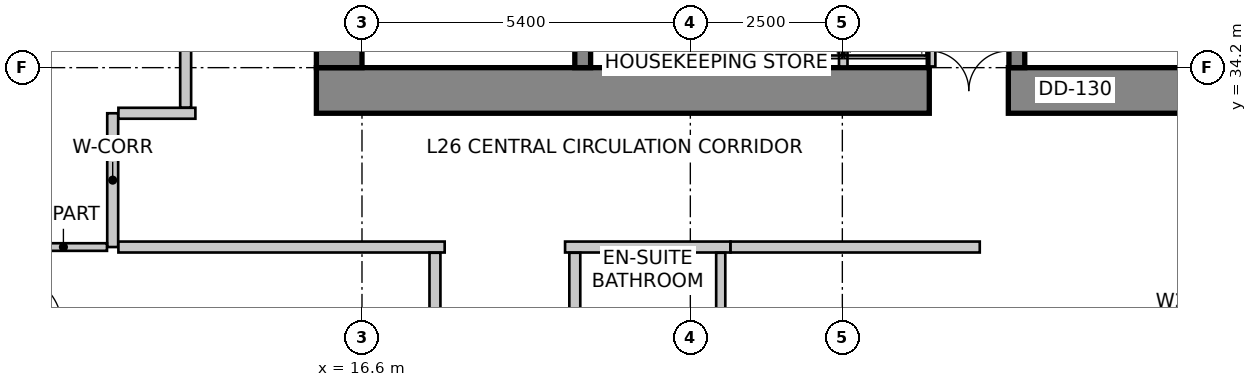
"""IFC4 building model, lengths in metres.
Left out: names, types, materials, properties, quantities, classifications, styles, units other than length and angle.
Written with IfcOpenShell. Run it as: python <this file> out.ifc"""

import sys

from ifc_helpers import new_model, si_unit, direction, frame, frame_2d, origin, place, context, subcontext, project, spatial, rectangle, extrude, source, transform, mapped, element, fill, save


model = new_model("IFC4")
c1 = context("Model", 3, precision=1e-05, world=origin(), true_north=direction((0.0, 1.0)))
c2 = subcontext(c1, "Body", "Model", "MODEL_VIEW")
j1 = project(units=[si_unit("LENGTHUNIT", "METRE"), si_unit("PLANEANGLEUNIT", "RADIAN")], contexts=[c1])
p1 = place(None, origin())
s1 = spatial("IfcSite", under=j1, at=p1, CompositionType="ELEMENT")
p2 = place(p1, origin())
s2 = spatial("IfcBuilding", under=s1, at=p2, CompositionType="ELEMENT")
p3 = place(p2, frame((0.0, 0.0, 110.6)))
s3 = spatial("IfcBuildingStorey", under=s2, at=p3, CompositionType="ELEMENT", Elevation=110.6)
p4 = place(p3, frame((15.85, 33.825, 0.0), z_axis=(0.0, 0.0, 1.0), x_axis=(1.0, 0.0, 0.0)))
e1 = element("IfcWall", 1, at=p4, inside=s3, PredefinedType="SHEAR", context=c2, shape_type="SweptSolid", body=[
    extrude(rectangle(XDim=15.9, YDim=0.75, at=frame_2d((7.95, 0.0))), origin(), (0.0, 0.0, 1.0), 3.6),
])
m1 = source(origin(), c2, "Body", "SweptSolid", [
    extrude(rectangle(XDim=1.3, YDim=2.15, at=frame_2d((0.65, 1.075))), frame((0.0, 0.385, 0.0), z_axis=(0.0, -1.0, 0.0), x_axis=(1.0, 0.0, 0.0)), (0.0, 0.0, 1.0), 0.77),
])
p5 = place(p4, frame((10.08, 0.0, 0.0)))
e2 = element("IfcOpeningElement", 2, at=p5, cuts=e1, PredefinedType="OPENING", context=c2, shape_type="MappedRepresentation", body=[
    mapped(m1, transform((0.0, 0.0, 0.0), scale=1.0)),
])
p6 = place(p3, frame((16.225, 34.2, 0.0), z_axis=(0.0, 0.0, 1.0), x_axis=(0.0, 1.0, 0.0)))
e3 = element("IfcWall", 3, at=p6, inside=s3, PredefinedType="SHEAR", context=c2, shape_type="SweptSolid", body=[
    extrude(rectangle(XDim=11.4, YDim=0.75, at=frame_2d((5.7, 0.0))), origin(), (0.0, 0.0, 1.0), 3.6),
])
m2 = source(origin(), c2, "Body", "SweptSolid", [
    extrude(rectangle(XDim=1.1, YDim=2.15, at=frame_2d((0.55, 1.075))), frame((0.0, 0.385, 0.0), z_axis=(0.0, -1.0, 0.0), x_axis=(1.0, 0.0, 0.0)), (0.0, 0.0, 1.0), 0.77),
])
p7 = place(p6, frame((7.15, 0.0, 0.0)))
e4 = element("IfcOpeningElement", 4, at=p7, cuts=e3, PredefinedType="OPENING", context=c2, shape_type="MappedRepresentation", body=[
    mapped(m2, transform((0.0, 0.0, 0.0), scale=1.0)),
])
p8 = place(p3, frame((20.23, 34.2, 0.0), z_axis=(0.0, 0.0, 1.0), x_axis=(0.0, 1.0, 0.0)))
e5 = element("IfcWall", 5, at=p8, inside=s3, PredefinedType="SHEAR", context=c2, shape_type="SweptSolid", body=[
    extrude(rectangle(XDim=9.06, YDim=0.26, at=frame_2d((4.53, 0.0))), origin(), (0.0, 0.0, 1.0), 3.6),
])
m3 = source(origin(), c2, "Body", "SweptSolid", [
    extrude(rectangle(XDim=1.1, YDim=2.15, at=frame_2d((0.55, 1.075))), frame((0.0, 0.14, 0.0), z_axis=(0.0, -1.0, 0.0), x_axis=(1.0, 0.0, 0.0)), (0.0, 0.0, 1.0), 0.28),
])
p9 = place(p8, frame((7.45, 0.0, 0.0)))
e6 = element("IfcOpeningElement", 6, at=p9, cuts=e5, PredefinedType="OPENING", context=c2, shape_type="MappedRepresentation", body=[
    mapped(m3, transform((0.0, 0.0, 0.0), scale=1.0)),
])
p10 = place(p3, frame((27.37, 34.2, 0.0), z_axis=(0.0, 0.0, 1.0), x_axis=(0.0, 1.0, 0.0)))
e7 = element("IfcWall", 7, at=p10, inside=s3, PredefinedType="SHEAR", context=c2, shape_type="SweptSolid", body=[
    extrude(rectangle(XDim=9.06, YDim=0.26, at=frame_2d((4.53, 0.0))), origin(), (0.0, 0.0, 1.0), 3.6),
])
p11 = place(p10, frame((7.45, 0.0, 0.0)))
e8 = element("IfcOpeningElement", 8, at=p11, cuts=e7, PredefinedType="OPENING", context=c2, shape_type="MappedRepresentation", body=[
    mapped(m3, transform((0.0, 0.0, 0.0), scale=1.0)),
])
p12 = place(p3, frame((28.884, 28.792, 0.0), z_axis=(0.0, 0.0, 1.0), x_axis=(0.707064797706, 0.707148762175, 0.0)))
e9 = element("IfcWall", 9, at=p12, inside=s3, PredefinedType="SOLIDWALL", context=c2, shape_type="SweptSolid", body=[
    extrude(rectangle(XDim=2.908, YDim=0.3, at=frame_2d((1.454, 0.0))), origin(), (0.0, 0.0, 1.0), 3.35),
])
m4 = source(origin(), c2, "Body", "SweptSolid", [
    extrude(rectangle(XDim=1.8, YDim=2.1, at=frame_2d((0.9, 1.05))), frame((0.0, 0.16, 0.0), z_axis=(0.0, -1.0, 0.0), x_axis=(1.0, 0.0, 0.0)), (0.0, 0.0, 1.0), 0.32),
])
p13 = place(p12, frame((0.554, 0.0, 0.85)))
e10 = element("IfcOpeningElement", 10, at=p13, cuts=e9, PredefinedType="OPENING", context=c2, shape_type="MappedRepresentation", body=[
    mapped(m4, transform((0.0, 0.0, 0.0), scale=1.0)),
])
p14 = place(p3, frame((13.269, 47.134, 0.0), z_axis=(0.0, 0.0, 1.0), x_axis=(-0.319929596295, -0.947441319246, 0.0)))
e11 = element("IfcWall", 11, at=p14, inside=s3, PredefinedType="SOLIDWALL", context=c2, shape_type="SweptSolid", body=[
    extrude(rectangle(XDim=16.134, YDim=0.3, at=frame_2d((8.067, 0.0))), origin(), (0.0, 0.0, 1.0), 3.35),
])
m5 = source(origin(), c2, "Body", "SweptSolid", [
    extrude(rectangle(XDim=2.4, YDim=2.2, at=frame_2d((1.2, 1.1))), frame((0.0, 0.16, 0.0), z_axis=(0.0, -1.0, 0.0), x_axis=(1.0, 0.0, 0.0)), (0.0, 0.0, 1.0), 0.32),
])
p15 = place(p14, frame((2.276, 0.0, 0.85)))
e12 = element("IfcOpeningElement", 12, at=p15, cuts=e11, PredefinedType="OPENING", context=c2, shape_type="MappedRepresentation", body=[
    mapped(m5, transform((0.0, 0.0, 0.0), scale=1.0)),
])
m6 = source(origin(), c2, "Body", "SweptSolid", [
    extrude(rectangle(XDim=2.1, YDim=2.0, at=frame_2d((1.05, 1.0))), frame((0.0, 0.16, 0.0), z_axis=(0.0, -1.0, 0.0), x_axis=(1.0, 0.0, 0.0)), (0.0, 0.0, 1.0), 0.32),
])
p16 = place(p14, frame((7.361, 0.0, 0.85)))
e13 = element("IfcOpeningElement", 13, at=p16, cuts=e11, PredefinedType="OPENING", context=c2, shape_type="MappedRepresentation", body=[
    mapped(m6, transform((0.0, 0.0, 0.0), scale=1.0)),
])
p17 = place(p14, frame((12.147, 0.0, 0.85)))
e14 = element("IfcOpeningElement", 14, at=p17, cuts=e11, PredefinedType="OPENING", context=c2, shape_type="MappedRepresentation", body=[
    mapped(m5, transform((0.0, 0.0, 0.0), scale=1.0)),
])
p18 = place(p3, frame((8.185, 31.834, 0.0), z_axis=(0.0, 0.0, 1.0), x_axis=(0.189707113148, -0.981840725994, 0.0)))
e15 = element("IfcWall", 15, at=p18, inside=s3, PredefinedType="SOLIDWALL", context=c2, shape_type="SweptSolid", body=[
    extrude(rectangle(XDim=21.221, YDim=0.3, at=frame_2d((10.611, 0.0))), origin(), (0.0, 0.0, 1.0), 3.35),
])
m7 = source(origin(), c2, "Body", "SweptSolid", [
    extrude(rectangle(XDim=1.2, YDim=1.6, at=frame_2d((0.6, 0.8))), frame((0.0, 0.16, 0.0), z_axis=(0.0, -1.0, 0.0), x_axis=(1.0, 0.0, 0.0)), (0.0, 0.0, 1.0), 0.32),
])
p19 = place(p18, frame((1.127, 0.0, 0.85)))
e16 = element("IfcOpeningElement", 16, at=p19, cuts=e15, PredefinedType="OPENING", context=c2, shape_type="MappedRepresentation", body=[
    mapped(m7, transform((0.0, 0.0, 0.0), scale=1.0)),
])
p20 = place(p18, frame((4.369, 0.0, 0.85)))
e17 = element("IfcOpeningElement", 17, at=p20, cuts=e15, PredefinedType="OPENING", context=c2, shape_type="MappedRepresentation", body=[
    mapped(m6, transform((0.0, 0.0, 0.0), scale=1.0)),
])
p21 = place(p18, frame((8.521, 0.0, 0.85)))
e18 = element("IfcOpeningElement", 18, at=p21, cuts=e15, PredefinedType="OPENING", context=c2, shape_type="MappedRepresentation", body=[
    mapped(m7, transform((0.0, 0.0, 0.0), scale=1.0)),
])
p22 = place(p18, frame((12.021, 0.0, 0.85)))
e19 = element("IfcOpeningElement", 19, at=p22, cuts=e15, PredefinedType="OPENING", context=c2, shape_type="MappedRepresentation", body=[
    mapped(m6, transform((0.0, 0.0, 0.0), scale=1.0)),
])
p23 = place(p18, frame((17.091, 0.0, 0.85)))
e20 = element("IfcOpeningElement", 20, at=p23, cuts=e15, PredefinedType="OPENING", context=c2, shape_type="MappedRepresentation", body=[
    mapped(m5, transform((0.0, 0.0, 0.0), scale=1.0)),
])
for number, where, z_axis, x_axis in (
    (21, (25.96, 34.22, 0.0), (0.0, 0.0, 1.0), (0.0, 1.0, 0.0)),
    (22, (23.07, 34.22, 0.0), (0.0, 0.0, 1.0), (0.0, 1.0, 0.0)),
    (23, (24.515, 34.22, 0.0), (0.0, 0.0, 1.0), (0.0, 1.0, 0.0)),
):
    element("IfcWall", number, at=place(p3, frame(where, z_axis=z_axis, x_axis=x_axis)), inside=s3, PredefinedType="SOLIDWALL", context=c2, shape_type="SweptSolid", body=[
        extrude(rectangle(XDim=1.62, YDim=0.14, at=frame_2d((0.81, 0.0))), origin(), (0.0, 0.0, 1.0), 2.642),
    ])
p24 = place(p3, frame((12.5, 31.25, 0.0), z_axis=(0.0, 0.0, 1.0), x_axis=(0.0, 1.0, 0.0)))
e24 = element("IfcWall", 24, at=p24, inside=s3, PredefinedType="PARTITIONING", context=c2, shape_type="SweptSolid", body=[
    extrude(rectangle(XDim=2.2, YDim=0.18, at=frame_2d((1.1, 0.0))), origin(), (0.0, 0.0, 1.0), 3.034),
])
p25 = place(p3, frame((12.594, 33.45, 0.0), z_axis=(0.0, 0.0, 1.0), x_axis=(1.0, 0.0, 0.0)))
e25 = element("IfcWall", 25, at=p25, inside=s3, PredefinedType="PARTITIONING", context=c2, shape_type="SweptSolid", body=[
    extrude(rectangle(XDim=1.266, YDim=0.18, at=frame_2d((0.633, 0.0))), origin(), (0.0, 0.0, 1.0), 3.35),
])
p26 = place(p3, frame((17.96, 31.25, 0.0), z_axis=(0.0, 0.0, 1.0), x_axis=(-1.0, 0.0, 0.0)))
e26 = element("IfcWall", 26, at=p26, inside=s3, PredefinedType="PARTITIONING", context=c2, shape_type="SweptSolid", body=[
    extrude(rectangle(XDim=5.366, YDim=0.18, at=frame_2d((2.683, 0.0))), origin(), (0.0, 0.0, 1.0), 3.034),
])
p27 = place(p3, frame((22.66, 31.25, 0.0), z_axis=(0.0, 0.0, 1.0), x_axis=(-1.0, 0.0, 0.0)))
e27 = element("IfcWall", 27, at=p27, inside=s3, PredefinedType="PARTITIONING", context=c2, shape_type="SweptSolid", body=[
    extrude(rectangle(XDim=2.72, YDim=0.18, at=frame_2d((1.36, 0.0))), origin(), (0.0, 0.0, 1.0), 3.034),
])
p28 = place(p3, frame((26.76, 31.25, 0.0), z_axis=(0.0, 0.0, 1.0), x_axis=(-1.0, 0.0, 0.0)))
e28 = element("IfcWall", 28, at=p28, inside=s3, PredefinedType="PARTITIONING", context=c2, shape_type="SweptSolid", body=[
    extrude(rectangle(XDim=4.098, YDim=0.18, at=frame_2d((2.049, 0.0))), origin(), (0.0, 0.0, 1.0), 3.35),
])
p29 = place(p3, frame((13.7, 33.544, 0.0), z_axis=(0.0, 0.0, 1.0), x_axis=(0.0, 1.0, 0.0)))
e29 = element("IfcWall", 29, at=p29, inside=s3, PredefinedType="PARTITIONING", context=c2, shape_type="SweptSolid", body=[
    extrude(rectangle(XDim=13.86, YDim=0.18, at=frame_2d((6.93, 0.0))), origin(), (0.0, 0.0, 1.0), 2.492),
])
m8 = source(origin(), c2, "Body", "SweptSolid", [
    extrude(rectangle(XDim=0.9, YDim=2.15, at=frame_2d((0.45, 1.075))), frame((0.0, 0.1, 0.0), z_axis=(0.0, -1.0, 0.0), x_axis=(1.0, 0.0, 0.0)), (0.0, 0.0, 1.0), 0.2),
])
p30 = place(p29, frame((4.253, 0.0, 0.0)))
e30 = element("IfcOpeningElement", 30, at=p30, cuts=e29, PredefinedType="OPENING", context=c2, shape_type="MappedRepresentation", body=[
    mapped(m8, transform((0.0, 0.0, 0.0), scale=1.0)),
])
p31 = place(p3, frame((12.406, 31.25, 0.0), z_axis=(0.0, 0.0, 1.0), x_axis=(-1.0, 0.0, 0.0)))
e31 = element("IfcWall", 31, at=p31, inside=s3, PredefinedType="PARTITIONING", context=c2, shape_type="SweptSolid", body=[
    extrude(rectangle(XDim=1.433, YDim=0.125, at=frame_2d((0.717, 0.0))), origin(), (0.0, 0.0, 1.0), 2.492),
])
p32 = place(p3, frame((17.8, 24.162, 0.0), z_axis=(0.0, 0.0, 1.0), x_axis=(0.0, 1.0, 0.0)))
e32 = element("IfcWall", 32, at=p32, inside=s3, PredefinedType="PARTITIONING", context=c2, shape_type="SweptSolid", body=[
    extrude(rectangle(XDim=6.994, YDim=0.18, at=frame_2d((3.497, 0.0))), origin(), (0.0, 0.0, 1.0), 2.803),
])
p33 = place(p32, frame((3.047, 0.0, 0.0)))
e33 = element("IfcOpeningElement", 33, at=p33, cuts=e32, PredefinedType="OPENING", context=c2, shape_type="MappedRepresentation", body=[
    mapped(m8, transform((0.0, 0.0, 0.0), scale=1.0)),
])
p34 = place(p3, frame((20.1, 31.156, 0.0), z_axis=(0.0, 0.0, 1.0), x_axis=(0.0, -1.0, 0.0)))
e34 = element("IfcWall", 34, at=p34, inside=s3, PredefinedType="PARTITIONING", context=c2, shape_type="SweptSolid", body=[
    extrude(rectangle(XDim=2.266, YDim=0.18, at=frame_2d((1.133, 0.0))), origin(), (0.0, 0.0, 1.0), 3.034),
])
p35 = place(p3, frame((22.5, 31.156, 0.0), z_axis=(0.0, 0.0, 1.0), x_axis=(0.0, -1.0, 0.0)))
e35 = element("IfcWall", 35, at=p35, inside=s3, PredefinedType="PARTITIONING", context=c2, shape_type="SweptSolid", body=[
    extrude(rectangle(XDim=2.027, YDim=0.15, at=frame_2d((1.014, 0.0))), origin(), (0.0, 0.0, 1.0), 3.034),
])
m9 = source(origin(), c2, "Body", "SweptSolid", [
    extrude(rectangle(XDim=1.8, YDim=2.1, at=frame_2d((0.9, 1.05))), frame((0.0, -0.015, 0.0), z_axis=(0.0, -1.0, 0.0), x_axis=(1.0, 0.0, 0.0)), (0.0, 0.0, 1.0), 0.06),
])
p36 = place(p13, origin())
e36 = element("IfcWindow", 36, at=p36, inside=s3, PartitioningType="SINGLE_PANEL", PredefinedType="WINDOW", context=c2, shape_type="MappedRepresentation", body=[
    mapped(m9, transform((0.0, 0.0, 0.0), scale=1.0)),
])
fill(e10, e36)
m10 = source(origin(), c2, "Body", "SweptSolid", [
    extrude(rectangle(XDim=1.3, YDim=2.15, at=frame_2d((0.65, 1.075))), frame((0.0, 0.025, 0.0), z_axis=(0.0, -1.0, 0.0), x_axis=(1.0, 0.0, 0.0)), (0.0, 0.0, 1.0), 0.05),
])
p37 = place(p5, origin())
e37 = element("IfcDoor", 37, at=p37, inside=s3, OperationType="DOUBLE_DOOR_SINGLE_SWING", PredefinedType="DOOR", context=c2, shape_type="MappedRepresentation", body=[
    mapped(m10, transform((0.0, 0.0, 0.0), scale=1.0)),
])
fill(e2, e37)
save(model, sys.argv[1])
